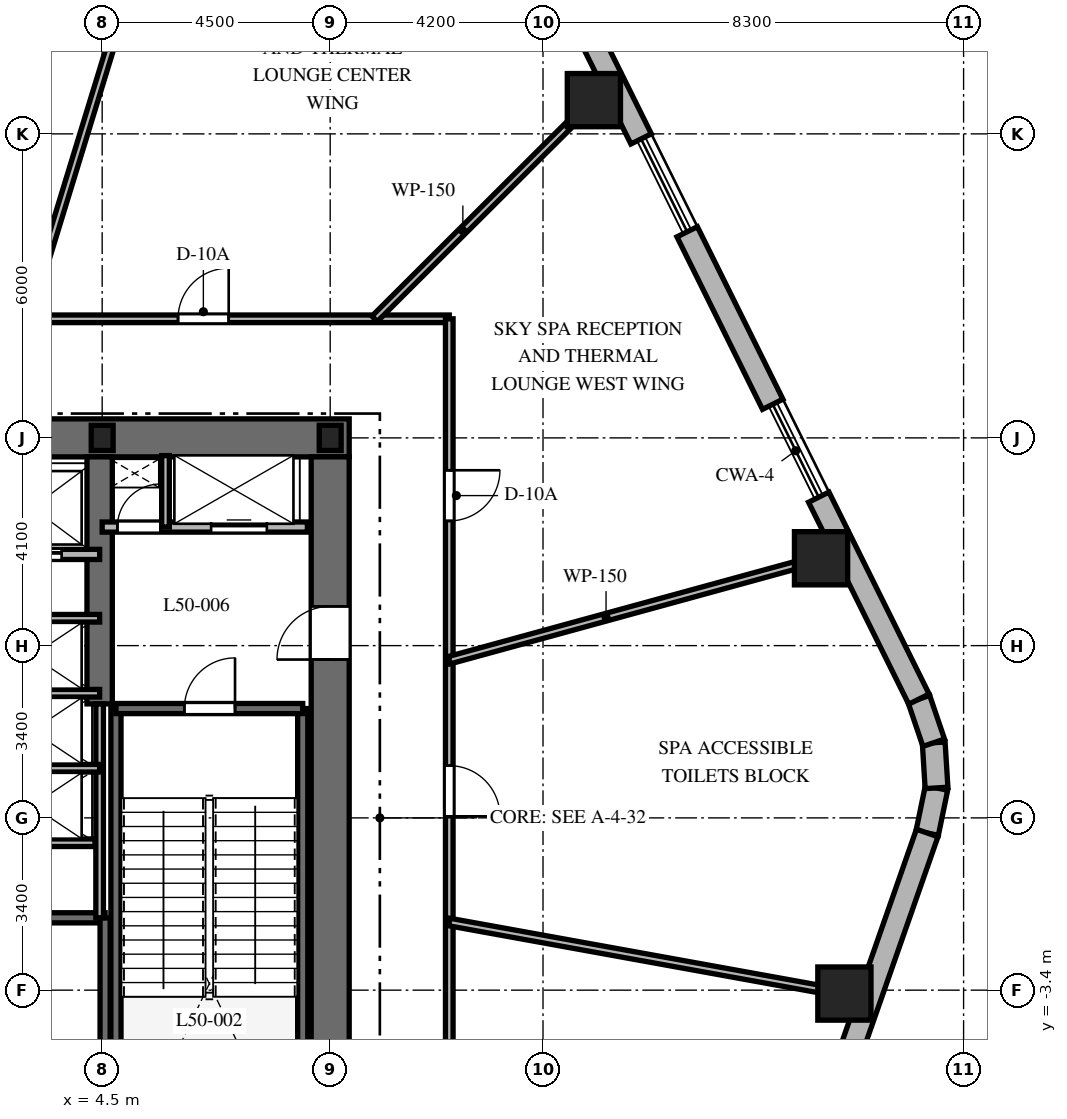
"""IFC4 building model, lengths in metres.
Left out: names, types, materials, properties, quantities, classifications, styles, units other than length and angle.
Written with IfcOpenShell. Run it as: python <this file> out.ifc"""

import sys

from ifc_helpers import new_model, si_unit, direction, frame, frame_2d, origin, origin_2d, place, context, subcontext, project, spatial, rectangle, i_section, extrude, element, fill, save


model = new_model("IFC4")
c1 = context("Model", 3, precision=1e-05, world=origin(), true_north=direction((0.0, 1.0)))
c2 = subcontext(c1, "Body", "Model", "MODEL_VIEW")
j1 = project(units=[si_unit("LENGTHUNIT", "METRE"), si_unit("PLANEANGLEUNIT", "RADIAN")], contexts=[c1])
p1 = place(None, origin())
s1 = spatial("IfcSite", under=j1, at=p1, CompositionType="ELEMENT")
p2 = place(p1, origin())
s2 = spatial("IfcBuilding", under=s1, at=p2, CompositionType="ELEMENT")
p3 = place(p2, frame((0.0, 0.0, 201.5)))
s3 = spatial("IfcBuildingStorey", under=s2, at=p3, CompositionType="ELEMENT", Elevation=201.5)
p4 = place(p3, frame((1.85, 7.5, 0.0), z_axis=(0.0, 0.0, 1.0), x_axis=(1.0, 0.0, 0.0)))
e1 = element("IfcWall", 1, at=p4, inside=s3, PredefinedType="SHEAR", context=c2, shape_type="SweptSolid", body=[
    extrude(rectangle(XDim=7.525, YDim=0.75, at=frame_2d((3.762, 0.0))), origin(), (0.0, 0.0, 1.0), 5.0),
])
p5 = place(p3, frame((9.0, -7.125, 0.0), z_axis=(0.0, 0.0, 1.0), x_axis=(0.0, 1.0, 0.0)))
e2 = element("IfcWall", 2, at=p5, inside=s3, PredefinedType="SHEAR", context=c2, shape_type="SweptSolid", body=[
    extrude(rectangle(XDim=14.25, YDim=0.75, at=frame_2d((7.125, 0.0))), origin(), (0.0, 0.0, 1.0), 5.0),
])
p6 = place(p5, frame((10.25, 0.0, 0.0)))
e3 = element("IfcOpeningElement", 3, at=p6, cuts=e2, PredefinedType="OPENING", context=c2, shape_type="SweptSolid", body=[
    extrude(rectangle(XDim=1.05, YDim=2.15, at=frame_2d((0.525, 1.075))), frame((0.0, 0.385, 0.0), z_axis=(0.0, -1.0, 0.0), x_axis=(1.0, 0.0, 0.0)), (0.0, 0.0, 1.0), 0.77),
])
p7 = place(p3, frame((4.45, 2.25, 0.0), z_axis=(0.0, 0.0, 1.0), x_axis=(0.0, 1.0, 0.0)))
e4 = element("IfcWall", 4, at=p7, inside=s3, PredefinedType="SHEAR", context=c2, shape_type="SweptSolid", body=[
    extrude(rectangle(XDim=4.875, YDim=0.5, at=frame_2d((2.438, 0.0))), origin(), (0.0, 0.0, 1.0), 5.0),
])
for number, where, z_axis, x_axis in (
    (5, (4.772, -6.985, 0.0), (0.0, 0.0, 1.0), (0.0, 1.0, 0.0)),
    (6, (8.458, -6.985, 0.0), (0.0, 0.0, 1.0), (0.0, 1.0, 0.0)),
):
    element("IfcWall", number, at=place(p3, frame(where, z_axis=z_axis, x_axis=x_axis)), inside=s3, PredefinedType="SHEAR", context=c2, shape_type="SweptSolid", body=[
        extrude(rectangle(XDim=9.143, YDim=0.2, at=frame_2d((4.572, 0.0))), origin(), (0.0, 0.0, 1.0), 5.0),
    ])
p8 = place(p3, frame((4.772, 2.158, 0.0), z_axis=(0.0, 0.0, 1.0), x_axis=(1.0, 0.0, 0.0)))
e7 = element("IfcWall", 7, at=p8, inside=s3, PredefinedType="SHEAR", context=c2, shape_type="SweptSolid", body=[
    extrude(rectangle(XDim=3.686, YDim=0.2, at=frame_2d((1.843, 0.0))), origin(), (0.0, 0.0, 1.0), 5.0),
])
p9 = place(p8, frame((1.35, 0.0, 0.0)))
e8 = element("IfcOpeningElement", 8, at=p9, cuts=e7, PredefinedType="OPENING", context=c2, shape_type="SweptSolid", body=[
    extrude(rectangle(XDim=1.0, YDim=2.15, at=frame_2d((0.5, 1.075))), frame((0.0, 0.11, 0.0), z_axis=(0.0, -1.0, 0.0), x_axis=(1.0, 0.0, 0.0)), (0.0, 0.0, 1.0), 0.22),
])
p10 = place(p3, frame((-4.608, -1.972, 0.0), z_axis=(0.0, 0.0, 1.0), x_axis=(1.0, 0.0, 0.0)))
e9 = element("IfcWall", 9, at=p10, inside=s3, PredefinedType="SHEAR", context=c2, shape_type="SweptSolid", body=[
    extrude(rectangle(XDim=9.166, YDim=0.2, at=frame_2d((4.583, 0.0))), origin(), (0.0, 0.0, 1.0), 5.0),
])
p11 = place(p3, frame((4.558, -5.658, 0.0), z_axis=(0.0, 0.0, 1.0), x_axis=(0.0, 1.0, 0.0)))
e10 = element("IfcWall", 10, at=p11, inside=s3, PredefinedType="SHEAR", context=c2, shape_type="SweptSolid", body=[
    extrude(rectangle(XDim=3.686, YDim=0.2, at=frame_2d((1.843, 0.0))), origin(), (0.0, 0.0, 1.0), 5.0),
])
for number, where, z_axis, x_axis in (
    (11, (9.0, 7.5, 0.0), (0.0, 0.0, 1.0), (1.0, 0.0, 0.0)),
    (12, (4.5, 7.5, 0.0), (0.0, 0.0, 1.0), (1.0, 0.0, 0.0)),
):
    element("IfcColumn", number, at=place(p3, frame(where, z_axis=z_axis, x_axis=x_axis)), inside=s3, PredefinedType="COLUMN", context=c2, shape_type="SweptSolid", body=[
        extrude(i_section(OverallWidth=0.432, OverallDepth=0.498, WebThickness=0.056, FlangeThickness=0.089, at=origin_2d()), origin(), (0.0, 0.0, 1.0), 5.0),
    ])
for number, where, z_axis, x_axis in (
    (13, (19.148, -3.467, 0.0), (0.0, 0.0, 1.0), (1.0, 0.0, 0.0)),
    (14, (18.687, 5.124, 0.0), (0.0, 0.0, 1.0), (1.0, 0.0, 0.0)),
    (15, (14.204, 14.166, 0.0), (0.0, 0.0, 1.0), (1.0, 0.0, 0.0)),
):
    element("IfcColumn", number, at=place(p3, frame(where, z_axis=z_axis, x_axis=x_axis)), inside=s3, PredefinedType="COLUMN", context=c2, shape_type="SweptSolid", body=[
        extrude(rectangle(XDim=1.05, YDim=1.05, at=origin_2d()), origin(), (0.0, 0.0, 1.0), 5.0),
    ])
p12 = place(p3, frame((20.782, -0.298, 0.0), z_axis=(0.0, 0.0, 1.0), x_axis=(0.202570068411, 0.979267771033, 0.0)))
e16 = element("IfcWall", 16, at=p12, inside=s3, PredefinedType="SOLIDWALL", context=c2, shape_type="SweptSolid", body=[
    extrude(rectangle(XDim=0.909, YDim=0.45, at=frame_2d((0.454, 0.0))), origin(), (0.0, 0.0, 1.0), 4.7),
])
p13 = place(p3, frame((20.966, 0.592, 0.0), z_axis=(0.0, 0.0, 1.0), x_axis=(-0.061748898935, 0.998091715966, 0.0)))
e17 = element("IfcWall", 17, at=p13, inside=s3, PredefinedType="SOLIDWALL", context=c2, shape_type="SweptSolid", body=[
    extrude(rectangle(XDim=0.894, YDim=0.45, at=frame_2d((0.447, 0.0))), origin(), (0.0, 0.0, 1.0), 4.7),
])
p14 = place(p3, frame((20.911, 1.484, 0.0), z_axis=(0.0, 0.0, 1.0), x_axis=(-0.321623334353, 0.946867694453, 0.0)))
e18 = element("IfcWall", 18, at=p14, inside=s3, PredefinedType="SOLIDWALL", context=c2, shape_type="SweptSolid", body=[
    extrude(rectangle(XDim=0.909, YDim=0.45, at=frame_2d((0.454, 0.0))), origin(), (0.0, 0.0, 1.0), 4.7),
])
p15 = place(p3, frame((19.252, -4.669, 0.0), z_axis=(0.0, 0.0, 1.0), x_axis=(0.330411483424, 0.943836983606, 0.0)))
e19 = element("IfcWall", 19, at=p15, inside=s3, PredefinedType="SOLIDWALL", context=c2, shape_type="SweptSolid", body=[
    extrude(rectangle(XDim=4.631, YDim=0.45, at=frame_2d((2.315, 0.0))), origin(), (0.0, 0.0, 1.0), 4.7),
])
p16 = place(p3, frame((20.618, 2.344, 0.0), z_axis=(0.0, 0.0, 1.0), x_axis=(-0.444248024627, 0.895903841166, 0.0)))
e20 = element("IfcWall", 20, at=p16, inside=s3, PredefinedType="SOLIDWALL", context=c2, shape_type="SweptSolid", body=[
    extrude(rectangle(XDim=4.449, YDim=0.45, at=frame_2d((2.225, 0.0))), origin(), (0.0, 0.0, 1.0), 4.7),
])
p17 = place(p3, frame((17.733, 8.163, 0.0), z_axis=(0.0, 0.0, 1.0), x_axis=(-0.444229875213, 0.895912840609, 0.0)))
e21 = element("IfcWall", 21, at=p17, inside=s3, PredefinedType="SOLIDWALL", context=c2, shape_type="SweptSolid", body=[
    extrude(rectangle(XDim=3.8, YDim=0.45, at=frame_2d((1.9, 0.0))), origin(), (0.0, 0.0, 1.0), 4.7),
])
p18 = place(p3, frame((15.136, 13.4, 0.0), z_axis=(0.0, 0.0, 1.0), x_axis=(-0.444243648127, 0.895906011308, 0.0)))
e22 = element("IfcWall", 22, at=p18, inside=s3, PredefinedType="SOLIDWALL", context=c2, shape_type="SweptSolid", body=[
    extrude(rectangle(XDim=4.443, YDim=0.45, at=frame_2d((2.221, 0.0))), origin(), (0.0, 0.0, 1.0), 4.7),
])
p19 = place(p3, frame((4.5, 5.74, 0.0), z_axis=(0.0, 0.0, 1.0), x_axis=(1.0, 0.0, 0.0)))
e23 = element("IfcWall", 23, at=p19, inside=s3, PredefinedType="PARTITIONING", context=c2, shape_type="SweptSolid", body=[
    extrude(rectangle(XDim=4.05, YDim=0.2, at=frame_2d((2.025, 0.0))), origin(), (0.0, 0.0, 1.0), 4.7),
])
p20 = place(p19, frame((0.3, 0.0, 0.0)))
e24 = element("IfcOpeningElement", 24, at=p20, cuts=e23, PredefinedType="OPENING", context=c2, shape_type="SweptSolid", body=[
    extrude(rectangle(XDim=0.85, YDim=2.03, at=frame_2d((0.425, 1.015))), frame((0.0, 0.11, 0.0), z_axis=(0.0, -1.0, 0.0), x_axis=(1.0, 0.0, 0.0)), (0.0, 0.0, 1.0), 0.22),
])
p21 = place(p19, frame((2.15, 0.0, 0.0)))
e25 = element("IfcOpeningElement", 25, at=p21, cuts=e23, PredefinedType="OPENING", context=c2, shape_type="SweptSolid", body=[
    extrude(rectangle(XDim=1.1, YDim=2.2, at=frame_2d((0.55, 1.1))), frame((0.0, 0.11, 0.0), z_axis=(0.0, -1.0, 0.0), x_axis=(1.0, 0.0, 0.0)), (0.0, 0.0, 1.0), 0.22),
])
p22 = place(p3, frame((5.75, 5.74, 0.0), z_axis=(0.0, 0.0, 1.0), x_axis=(0.0, 1.0, 0.0)))
e26 = element("IfcWall", 26, at=p22, inside=s3, PredefinedType="PARTITIONING", context=c2, shape_type="SweptSolid", body=[
    extrude(rectangle(XDim=1.41, YDim=0.15, at=frame_2d((0.705, 0.0))), origin(), (0.0, 0.0, 1.0), 4.7),
])
p23 = place(p3, frame((1.85, 5.2, 0.0), z_axis=(0.0, 0.0, 1.0), x_axis=(1.0, 0.0, 0.0)))
e27 = element("IfcWall", 27, at=p23, inside=s3, PredefinedType="PARTITIONING", context=c2, shape_type="SweptSolid", body=[
    extrude(rectangle(XDim=2.6, YDim=0.2, at=frame_2d((1.3, 0.0))), origin(), (0.0, 0.0, 1.0), 4.7),
])
p24 = place(p23, frame((0.75, 0.0, 0.0)))
e28 = element("IfcOpeningElement", 28, at=p24, cuts=e27, PredefinedType="OPENING", context=c2, shape_type="SweptSolid", body=[
    extrude(rectangle(XDim=1.1, YDim=2.2, at=frame_2d((0.55, 1.1))), frame((0.0, 0.11, 0.0), z_axis=(0.0, -1.0, 0.0), x_axis=(1.0, 0.0, 0.0)), (0.0, 0.0, 1.0), 0.22),
])
p25 = place(p3, frame((4.45, -1.972, 0.0), z_axis=(0.0, 0.0, 1.0), x_axis=(0.0, 1.0, 0.0)))
e29 = element("IfcWall", 29, at=p25, inside=s3, PredefinedType="PARTITIONING", context=c2, shape_type="SweptSolid", body=[
    extrude(rectangle(XDim=4.222, YDim=0.15, at=frame_2d((2.111, 0.0))), origin(), (0.0, 0.0, 1.0), 4.7),
])
for number, where, z_axis, x_axis in (
    (30, (1.9, 3.94, 0.0), (0.0, 0.0, 1.0), (1.0, 0.0, 0.0)),
    (31, (1.9, 0.98, 0.0), (0.0, 0.0, 1.0), (1.0, 0.0, 0.0)),
    (32, (1.9, 2.46, 0.0), (0.0, 0.0, 1.0), (1.0, 0.0, 0.0)),
):
    element("IfcWall", number, at=place(p3, frame(where, z_axis=z_axis, x_axis=x_axis)), inside=s3, PredefinedType="PARTITIONING", context=c2, shape_type="SweptSolid", body=[
        extrude(rectangle(XDim=2.55, YDim=0.15, at=frame_2d((1.275, 0.0))), origin(), (0.0, 0.0, 1.0), 4.7),
    ])
p26 = place(p3, frame((-4.36, -0.49, 0.0), z_axis=(0.0, 0.0, 1.0), x_axis=(1.0, 0.0, 0.0)))
e33 = element("IfcWall", 33, at=p26, inside=s3, PredefinedType="PARTITIONING", context=c2, shape_type="SweptSolid", body=[
    extrude(rectangle(XDim=8.72, YDim=0.15, at=frame_2d((4.36, 0.0))), origin(), (0.0, 0.0, 1.0), 4.7),
])
p27 = place(p26, frame((2.81, 0.0, 0.0)))
e34 = element("IfcOpeningElement", 34, at=p27, cuts=e33, PredefinedType="OPENING", context=c2, shape_type="SweptSolid", body=[
    extrude(rectangle(XDim=0.85, YDim=2.03, at=frame_2d((0.425, 1.015))), frame((0.0, 0.085, 0.0), z_axis=(0.0, -1.0, 0.0), x_axis=(1.0, 0.0, 0.0)), (0.0, 0.0, 1.0), 0.17),
])
p28 = place(p26, frame((4.61, 0.0, 0.0)))
e35 = element("IfcOpeningElement", 35, at=p28, cuts=e33, PredefinedType="OPENING", context=c2, shape_type="SweptSolid", body=[
    extrude(rectangle(XDim=0.85, YDim=2.03, at=frame_2d((0.425, 1.015))), frame((0.0, 0.085, 0.0), z_axis=(0.0, -1.0, 0.0), x_axis=(1.0, 0.0, 0.0)), (0.0, 0.0, 1.0), 0.17),
])
p29 = place(p3, frame((-11.35, 9.85, 0.0), z_axis=(0.0, 0.0, 1.0), x_axis=(1.0, 0.0, 0.0)))
e36 = element("IfcWall", 36, at=p29, inside=s3, PredefinedType="PARTITIONING", context=c2, shape_type="SweptSolid", body=[
    extrude(rectangle(XDim=22.7, YDim=0.15, at=frame_2d((11.35, 0.0))), origin(), (0.0, 0.0, 1.0), 2.89),
])
p30 = place(p29, frame((17.347, 0.0, 0.0)))
e37 = element("IfcOpeningElement", 37, at=p30, cuts=e36, PredefinedType="OPENING", context=c2, shape_type="SweptSolid", body=[
    extrude(rectangle(XDim=1.0, YDim=2.03, at=frame_2d((0.5, 1.015))), frame((0.0, 0.085, 0.0), z_axis=(0.0, -1.0, 0.0), x_axis=(1.0, 0.0, 0.0)), (0.0, 0.0, 1.0), 0.17),
])
p31 = place(p29, frame((10.423, 0.0, 0.0)))
e38 = element("IfcOpeningElement", 38, at=p31, cuts=e36, PredefinedType="OPENING", context=c2, shape_type="SweptSolid", body=[
    extrude(rectangle(XDim=1.0, YDim=2.03, at=frame_2d((0.5, 1.015))), frame((0.0, 0.085, 0.0), z_axis=(0.0, -1.0, 0.0), x_axis=(1.0, 0.0, 0.0)), (0.0, 0.0, 1.0), 0.17),
])
p32 = place(p29, frame((3.362, 0.0, 0.0)))
e39 = element("IfcOpeningElement", 39, at=p32, cuts=e36, PredefinedType="OPENING", context=c2, shape_type="SweptSolid", body=[
    extrude(rectangle(XDim=1.0, YDim=2.03, at=frame_2d((0.5, 1.015))), frame((0.0, 0.085, 0.0), z_axis=(0.0, -1.0, 0.0), x_axis=(1.0, 0.0, 0.0)), (0.0, 0.0, 1.0), 0.17),
])
p33 = place(p3, frame((11.35, 9.85, 0.0), z_axis=(0.0, 0.0, 1.0), x_axis=(0.0, -1.0, 0.0)))
e40 = element("IfcWall", 40, at=p33, inside=s3, PredefinedType="PARTITIONING", context=c2, shape_type="SweptSolid", body=[
    extrude(rectangle(XDim=19.7, YDim=0.15, at=frame_2d((9.85, 0.0))), origin(), (0.0, 0.0, 1.0), 2.89),
])
p34 = place(p33, frame((2.989, 0.0, 0.0)))
e41 = element("IfcOpeningElement", 41, at=p34, cuts=e40, PredefinedType="OPENING", context=c2, shape_type="SweptSolid", body=[
    extrude(rectangle(XDim=1.0, YDim=2.03, at=frame_2d((0.5, 1.015))), frame((0.0, 0.085, 0.0), z_axis=(0.0, -1.0, 0.0), x_axis=(1.0, 0.0, 0.0)), (0.0, 0.0, 1.0), 0.17),
])
p35 = place(p33, frame((15.183, 0.0, 0.0)))
e42 = element("IfcOpeningElement", 42, at=p35, cuts=e40, PredefinedType="OPENING", context=c2, shape_type="SweptSolid", body=[
    extrude(rectangle(XDim=1.0, YDim=2.03, at=frame_2d((0.5, 1.015))), frame((0.0, 0.085, 0.0), z_axis=(0.0, -1.0, 0.0), x_axis=(1.0, 0.0, 0.0)), (0.0, 0.0, 1.0), 0.17),
])
p36 = place(p33, frame((8.819, 0.0, 0.0)))
e43 = element("IfcOpeningElement", 43, at=p36, cuts=e40, PredefinedType="OPENING", context=c2, shape_type="SweptSolid", body=[
    extrude(rectangle(XDim=1.0, YDim=2.03, at=frame_2d((0.5, 1.015))), frame((0.0, 0.085, 0.0), z_axis=(0.0, -1.0, 0.0), x_axis=(1.0, 0.0, 0.0)), (0.0, 0.0, 1.0), 0.17),
])
p37 = place(p3, frame((11.35, 3.112, 0.0), z_axis=(0.0, 0.0, 1.0), x_axis=(0.964400374182, 0.264446437445, 0.0)))
e44 = element("IfcWall", 44, at=p37, inside=s3, PredefinedType="PARTITIONING", context=c2, shape_type="SweptSolid", body=[
    extrude(rectangle(XDim=8.112, YDim=0.15, at=frame_2d((4.056, 0.0))), origin(), (0.0, 0.0, 1.0), 2.89),
])
p38 = place(p3, frame((9.876, 9.85, 0.0), z_axis=(0.0, 0.0, 1.0), x_axis=(0.708044623933, 0.706167692917, 0.0)))
e45 = element("IfcWall", 45, at=p38, inside=s3, PredefinedType="PARTITIONING", context=c2, shape_type="SweptSolid", body=[
    extrude(rectangle(XDim=6.634, YDim=0.15, at=frame_2d((3.317, 0.0))), origin(), (0.0, 0.0, 1.0), 2.89),
])
p39 = place(p3, frame((3.019, 9.85, 0.0), z_axis=(0.0, 0.0, 1.0), x_axis=(0.292996168014, 0.956113615387, 0.0)))
e46 = element("IfcWall", 46, at=p39, inside=s3, PredefinedType="PARTITIONING", context=c2, shape_type="SweptSolid", body=[
    extrude(rectangle(XDim=9.857, YDim=0.15, at=frame_2d((4.929, 0.0))), origin(), (0.0, 0.0, 1.0), 2.89),
])
p40 = place(p3, frame((11.35, -2.055, 0.0), z_axis=(0.0, 0.0, 1.0), x_axis=(0.983999921986, -0.178168890468, 0.0)))
e47 = element("IfcWall", 47, at=p40, inside=s3, PredefinedType="PARTITIONING", context=c2, shape_type="SweptSolid", body=[
    extrude(rectangle(XDim=8.426, YDim=0.15, at=frame_2d((4.213, 0.0))), origin(), (0.0, 0.0, 1.0), 2.89),
])
p41 = place(p9, origin())
e48 = element("IfcDoor", 48, at=p41, inside=s3, OperationType="SINGLE_SWING_RIGHT", PredefinedType="DOOR", context=c2, shape_type="SweptSolid", body=[
    extrude(rectangle(XDim=1.0, YDim=2.15, at=frame_2d((0.5, 1.075))), frame((0.0, 0.025, 0.0), z_axis=(0.0, -1.0, 0.0), x_axis=(1.0, 0.0, 0.0)), (0.0, 0.0, 1.0), 0.05),
])
fill(e8, e48)
p42 = place(p6, origin())
e49 = element("IfcDoor", 49, at=p42, inside=s3, OperationType="SINGLE_SWING_LEFT", PredefinedType="DOOR", context=c2, shape_type="SweptSolid", body=[
    extrude(rectangle(XDim=1.05, YDim=2.15, at=frame_2d((0.525, 1.075))), frame((0.0, 0.025, 0.0), z_axis=(0.0, -1.0, 0.0), x_axis=(1.0, 0.0, 0.0)), (0.0, 0.0, 1.0), 0.05),
])
fill(e3, e49)
p43 = place(p20, origin())
e50 = element("IfcDoor", 50, at=p43, inside=s3, OperationType="SINGLE_SWING_RIGHT", PredefinedType="DOOR", context=c2, shape_type="SweptSolid", body=[
    extrude(rectangle(XDim=0.85, YDim=2.03, at=frame_2d((0.425, 1.015))), frame((0.0, 0.025, 0.0), z_axis=(0.0, -1.0, 0.0), x_axis=(1.0, 0.0, 0.0)), (0.0, 0.0, 1.0), 0.05),
])
fill(e24, e50)
p44 = place(p21, origin())
e51 = element("IfcDoor", 51, at=p44, inside=s3, OperationType="SLIDING_TO_RIGHT", PredefinedType="DOOR", context=c2, shape_type="SweptSolid", body=[
    extrude(rectangle(XDim=1.1, YDim=2.2, at=frame_2d((0.55, 1.1))), frame((0.0, 0.025, 0.0), z_axis=(0.0, -1.0, 0.0), x_axis=(1.0, 0.0, 0.0)), (0.0, 0.0, 1.0), 0.05),
])
fill(e25, e51)
p45 = place(p24, origin())
e52 = element("IfcDoor", 52, at=p45, inside=s3, OperationType="SLIDING_TO_RIGHT", PredefinedType="DOOR", context=c2, shape_type="SweptSolid", body=[
    extrude(rectangle(XDim=1.1, YDim=2.2, at=frame_2d((0.55, 1.1))), frame((0.0, 0.025, 0.0), z_axis=(0.0, -1.0, 0.0), x_axis=(1.0, 0.0, 0.0)), (0.0, 0.0, 1.0), 0.05),
])
fill(e28, e52)
p46 = place(p34, origin())
e53 = element("IfcDoor", 53, at=p46, inside=s3, OperationType="SINGLE_SWING_LEFT", PredefinedType="DOOR", context=c2, shape_type="SweptSolid", body=[
    extrude(rectangle(XDim=1.0, YDim=2.03, at=frame_2d((0.5, 1.015))), frame((0.0, 0.025, 0.0), z_axis=(0.0, -1.0, 0.0), x_axis=(1.0, 0.0, 0.0)), (0.0, 0.0, 1.0), 0.05),
])
fill(e41, e53)
p47 = place(p30, origin())
e54 = element("IfcDoor", 54, at=p47, inside=s3, OperationType="SINGLE_SWING_RIGHT", PredefinedType="DOOR", context=c2, shape_type="SweptSolid", body=[
    extrude(rectangle(XDim=1.0, YDim=2.03, at=frame_2d((0.5, 1.015))), frame((0.0, 0.025, 0.0), z_axis=(0.0, -1.0, 0.0), x_axis=(1.0, 0.0, 0.0)), (0.0, 0.0, 1.0), 0.05),
])
fill(e37, e54)
p48 = place(p36, origin())
e55 = element("IfcDoor", 55, at=p48, inside=s3, OperationType="SINGLE_SWING_RIGHT", PredefinedType="DOOR", context=c2, shape_type="SweptSolid", body=[
    extrude(rectangle(XDim=1.0, YDim=2.03, at=frame_2d((0.5, 1.015))), frame((0.0, 0.025, 0.0), z_axis=(0.0, -1.0, 0.0), x_axis=(1.0, 0.0, 0.0)), (0.0, 0.0, 1.0), 0.05),
])
fill(e43, e55)
save(model, sys.argv[1])
